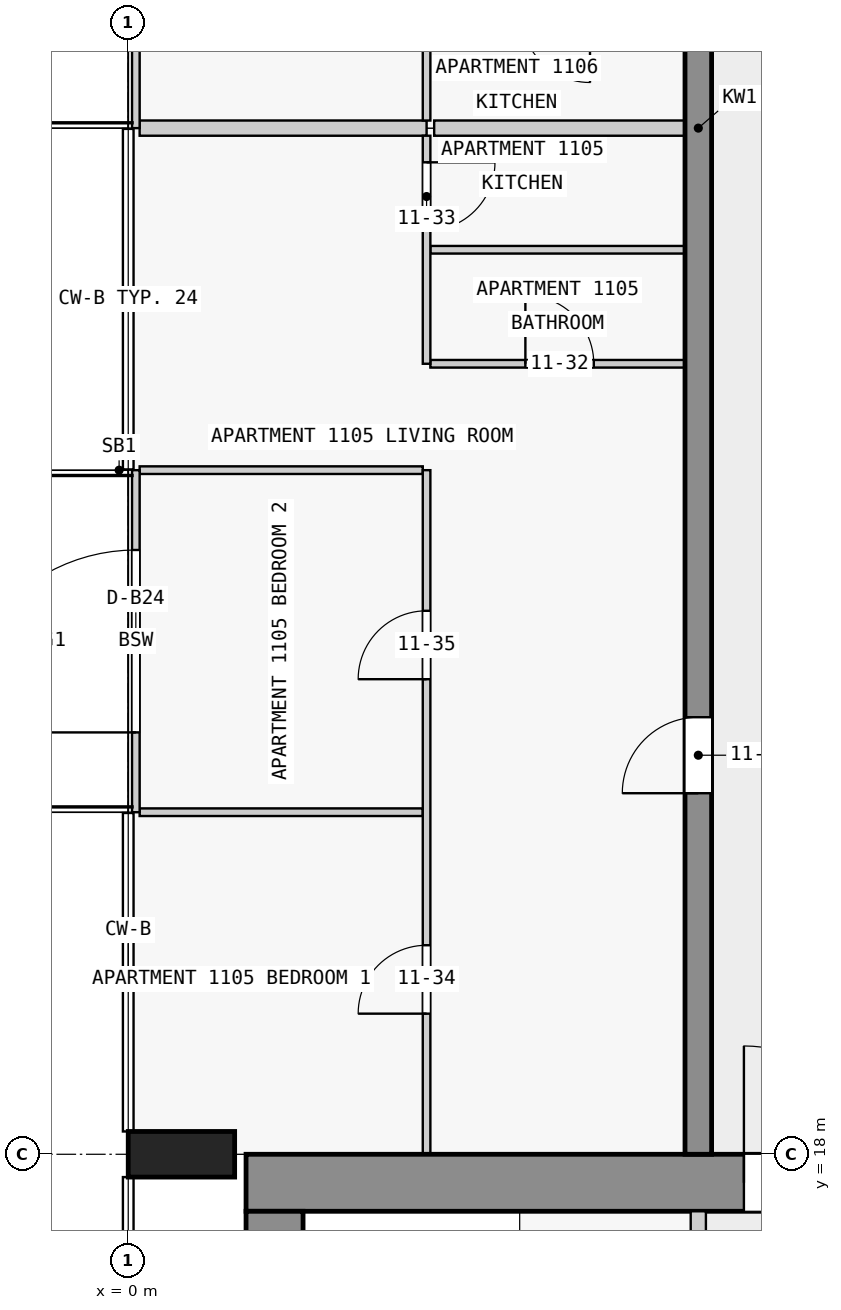
"""IFC4 building model, lengths in metres.
Left out: names, types, materials, properties, quantities, classifications, styles, units other than length and angle.
Written with IfcOpenShell. Run it as: python <this file> out.ifc"""

import sys

from ifc_helpers import new_model, si_unit, direction, frame, frame_2d, origin, origin_2d, place, context, subcontext, project, spatial, rectangle, extrude, element, fill, save


model = new_model("IFC4")
c1 = context("Model", 3, precision=1e-05, world=origin(), true_north=direction((0.0, 1.0)))
c2 = subcontext(c1, "Body", "Model", "MODEL_VIEW")
j1 = project(units=[si_unit("LENGTHUNIT", "METRE"), si_unit("PLANEANGLEUNIT", "RADIAN")], contexts=[c1])
p1 = place(None, origin())
s1 = spatial("IfcSite", under=j1, at=p1, CompositionType="ELEMENT")
p2 = place(p1, origin())
s2 = spatial("IfcBuilding", under=s1, at=p2, CompositionType="ELEMENT")
p3 = place(p2, frame((0.0, 0.0, 47.8)))
s3 = spatial("IfcBuildingStorey", under=s2, at=p3, CompositionType="ELEMENT", Elevation=47.8)
p4 = place(p3, frame((0.7, 18.0, 0.0), z_axis=(0.0, 0.0, 1.0), x_axis=(0.0, 1.0, 0.0)))
e1 = element("IfcColumn", 1, at=p4, inside=s3, PredefinedType="COLUMN", context=c2, shape_type="SweptSolid", body=[
    extrude(rectangle(XDim=0.6, YDim=1.4, at=origin_2d()), origin(), (0.0, 0.0, 1.0), 3.5),
])
p5 = place(p3, frame((1.55, 17.625, 0.0), z_axis=(0.0, 0.0, 1.0), x_axis=(1.0, 0.0, 0.0)))
e2 = element("IfcWall", 2, at=p5, inside=s3, PredefinedType="SHEAR", context=c2, shape_type="SweptSolid", body=[
    extrude(rectangle(XDim=20.95, YDim=0.75, at=frame_2d((10.475, 0.0))), origin(), (0.0, 0.0, 1.0), 3.25),
])
p6 = place(p5, frame((6.55, 0.0, 0.0)))
e3 = element("IfcOpeningElement", 3, at=p6, cuts=e2, PredefinedType="OPENING", context=c2, shape_type="SweptSolid", body=[
    extrude(rectangle(XDim=1.8, YDim=2.1, at=frame_2d((0.9, 1.05))), frame((0.0, 0.385, 0.0), z_axis=(0.0, -1.0, 0.0), x_axis=(1.0, 0.0, 0.0)), (0.0, 0.0, 1.0), 0.77),
])
p7 = place(p3, frame((1.925, 2.5, 0.0), z_axis=(0.0, 0.0, 1.0), x_axis=(0.0, 1.0, 0.0)))
e4 = element("IfcWall", 4, at=p7, inside=s3, PredefinedType="SHEAR", context=c2, shape_type="SweptSolid", body=[
    extrude(rectangle(XDim=14.75, YDim=0.75, at=frame_2d((7.375, 0.0))), origin(), (0.0, 0.0, 1.0), 3.25),
])
p8 = place(p3, frame((7.5, 18.0, 0.0), z_axis=(0.0, 0.0, 1.0), x_axis=(0.0, 1.0, 0.0)))
e5 = element("IfcWall", 5, at=p8, inside=s3, PredefinedType="SHEAR", context=c2, shape_type="SweptSolid", body=[
    extrude(rectangle(XDim=27.0, YDim=0.35, at=frame_2d((13.5, 0.0))), origin(), (0.0, 0.0, 1.0), 3.25),
])
p9 = place(p8, frame((4.75, 0.0, 0.0)))
e6 = element("IfcOpeningElement", 6, at=p9, cuts=e5, PredefinedType="OPENING", context=c2, shape_type="SweptSolid", body=[
    extrude(rectangle(XDim=1.0, YDim=2.1, at=frame_2d((0.5, 1.05))), frame((0.0, 0.185, 0.0), z_axis=(0.0, -1.0, 0.0), x_axis=(1.0, 0.0, 0.0)), (0.0, 0.0, 1.0), 0.37),
])
p10 = place(p8, frame((15.25, 0.0, 0.0)))
e7 = element("IfcOpeningElement", 7, at=p10, cuts=e5, PredefinedType="OPENING", context=c2, shape_type="SweptSolid", body=[
    extrude(rectangle(XDim=1.0, YDim=2.1, at=frame_2d((0.5, 1.05))), frame((0.0, 0.185, 0.0), z_axis=(0.0, -1.0, 0.0), x_axis=(1.0, 0.0, 0.0)), (0.0, 0.0, 1.0), 0.37),
])
p11 = place(p8, frame((19.75, 0.0, 0.0)))
e8 = element("IfcOpeningElement", 8, at=p11, cuts=e5, PredefinedType="OPENING", context=c2, shape_type="SweptSolid", body=[
    extrude(rectangle(XDim=1.0, YDim=2.1, at=frame_2d((0.5, 1.05))), frame((0.0, 0.185, 0.0), z_axis=(0.0, -1.0, 0.0), x_axis=(1.0, 0.0, 0.0)), (0.0, 0.0, 1.0), 0.37),
])
p12 = place(p8, frame((23.25, 0.0, 0.0)))
e9 = element("IfcOpeningElement", 9, at=p12, cuts=e5, PredefinedType="OPENING", context=c2, shape_type="SweptSolid", body=[
    extrude(rectangle(XDim=0.9, YDim=2.1, at=frame_2d((0.45, 1.05))), frame((0.0, 0.185, 0.0), z_axis=(0.0, -1.0, 0.0), x_axis=(1.0, 0.0, 0.0)), (0.0, 0.0, 1.0), 0.37),
])
p13 = place(p8, frame((25.45, 0.0, 0.0)))
e10 = element("IfcOpeningElement", 10, at=p13, cuts=e5, PredefinedType="OPENING", context=c2, shape_type="SweptSolid", body=[
    extrude(rectangle(XDim=1.0, YDim=2.1, at=frame_2d((0.5, 1.05))), frame((0.0, 0.185, 0.0), z_axis=(0.0, -1.0, 0.0), x_axis=(1.0, 0.0, 0.0)), (0.0, 0.0, 1.0), 0.37),
])
p14 = place(p3, frame((0.1, 22.5, 0.0), z_axis=(0.0, 0.0, 1.0), x_axis=(0.0, 1.0, 0.0)))
e11 = element("IfcWall", 11, at=p14, inside=s3, PredefinedType="STANDARD", context=c2, shape_type="SweptSolid", body=[
    extrude(rectangle(XDim=4.5, YDim=0.1, at=frame_2d((2.25, 0.0))), origin(), (0.0, 0.0, 1.0), 3.25),
])
p15 = place(p14, frame((1.05, 0.0, 0.0)))
e12 = element("IfcOpeningElement", 12, at=p15, cuts=e11, PredefinedType="OPENING", context=c2, shape_type="SweptSolid", body=[
    extrude(rectangle(XDim=2.4, YDim=2.4, at=frame_2d((1.2, 1.2))), frame((0.0, 0.06, 0.0), z_axis=(0.0, -1.0, 0.0), x_axis=(1.0, 0.0, 0.0)), (0.0, 0.0, 1.0), 0.12),
])
p16 = place(p3, frame((0.1, 31.5, 0.0), z_axis=(0.0, 0.0, 1.0), x_axis=(0.0, 1.0, 0.0)))
e13 = element("IfcWall", 13, at=p16, inside=s3, PredefinedType="STANDARD", context=c2, shape_type="SweptSolid", body=[
    extrude(rectangle(XDim=4.5, YDim=0.1, at=frame_2d((2.25, 0.0))), origin(), (0.0, 0.0, 1.0), 3.25),
])
p17 = place(p16, frame((1.05, 0.0, 0.0)))
e14 = element("IfcOpeningElement", 14, at=p17, cuts=e13, PredefinedType="OPENING", context=c2, shape_type="SweptSolid", body=[
    extrude(rectangle(XDim=2.4, YDim=2.4, at=frame_2d((1.2, 1.2))), frame((0.0, 0.06, 0.0), z_axis=(0.0, -1.0, 0.0), x_axis=(1.0, 0.0, 0.0)), (0.0, 0.0, 1.0), 0.12),
])
p18 = place(p3, frame((7.5, 10.1, 0.0), z_axis=(0.0, 0.0, 1.0), x_axis=(0.0, 1.0, 0.0)))
e15 = element("IfcWall", 15, at=p18, inside=s3, PredefinedType="PARTITIONING", context=c2, shape_type="SweptSolid", body=[
    extrude(rectangle(XDim=7.15, YDim=0.2, at=frame_2d((3.575, 0.0))), origin(), (0.0, 0.0, 1.0), 3.25),
])
p19 = place(p18, frame((1.5, 0.0, 0.0)))
e16 = element("IfcOpeningElement", 16, at=p19, cuts=e15, PredefinedType="OPENING", context=c2, shape_type="SweptSolid", body=[
    extrude(rectangle(XDim=0.9, YDim=2.1, at=frame_2d((0.45, 1.05))), frame((0.0, 0.11, 0.0), z_axis=(0.0, -1.0, 0.0), x_axis=(1.0, 0.0, 0.0)), (0.0, 0.0, 1.0), 0.22),
])
p20 = place(p18, frame((5.075, 0.0, 0.0)))
e17 = element("IfcOpeningElement", 17, at=p20, cuts=e15, PredefinedType="OPENING", context=c2, shape_type="SweptSolid", body=[
    extrude(rectangle(XDim=0.9, YDim=2.1, at=frame_2d((0.45, 1.05))), frame((0.0, 0.11, 0.0), z_axis=(0.0, -1.0, 0.0), x_axis=(1.0, 0.0, 0.0)), (0.0, 0.0, 1.0), 0.22),
])
for number, where, z_axis, x_axis in (
    (18, (3.875, 22.5, 0.0), (0.0, 0.0, 1.0), (-1.0, 0.0, 0.0)),
    (19, (3.875, 27.0, 0.0), (0.0, 0.0, 1.0), (-1.0, 0.0, 0.0)),
):
    element("IfcWall", number, at=place(p3, frame(where, z_axis=z_axis, x_axis=x_axis)), inside=s3, PredefinedType="PARTITIONING", context=c2, shape_type="SweptSolid", body=[
        extrude(rectangle(XDim=3.725, YDim=0.1, at=frame_2d((1.863, 0.0))), origin(), (0.0, 0.0, 1.0), 3.25),
    ])
p21 = place(p3, frame((3.975, 28.4, 0.0), z_axis=(0.0, 0.0, 1.0), x_axis=(1.0, 0.0, 0.0)))
e20 = element("IfcWall", 20, at=p21, inside=s3, PredefinedType="PARTITIONING", context=c2, shape_type="SweptSolid", body=[
    extrude(rectangle(XDim=3.35, YDim=0.1, at=frame_2d((1.675, 0.0))), origin(), (0.0, 0.0, 1.0), 3.25),
])
p22 = place(p21, frame((1.25, 0.0, 0.0)))
e21 = element("IfcOpeningElement", 21, at=p22, cuts=e20, PredefinedType="OPENING", context=c2, shape_type="SweptSolid", body=[
    extrude(rectangle(XDim=0.9, YDim=2.1, at=frame_2d((0.45, 1.05))), frame((0.0, 0.06, 0.0), z_axis=(0.0, -1.0, 0.0), x_axis=(1.0, 0.0, 0.0)), (0.0, 0.0, 1.0), 0.12),
])
p23 = place(p3, frame((7.325, 29.9, 0.0), z_axis=(0.0, 0.0, 1.0), x_axis=(-1.0, 0.0, 0.0)))
e22 = element("IfcWall", 22, at=p23, inside=s3, PredefinedType="PARTITIONING", context=c2, shape_type="SweptSolid", body=[
    extrude(rectangle(XDim=3.35, YDim=0.1, at=frame_2d((1.675, 0.0))), origin(), (0.0, 0.0, 1.0), 3.25),
])
p24 = place(p3, frame((7.325, 31.5, 0.0), z_axis=(0.0, 0.0, 1.0), x_axis=(-1.0, 0.0, 0.0)))
e23 = element("IfcWall", 23, at=p24, inside=s3, PredefinedType="PARTITIONING", context=c2, shape_type="SweptSolid", body=[
    extrude(rectangle(XDim=3.3, YDim=0.2, at=frame_2d((1.65, 0.0))), origin(), (0.0, 0.0, 1.0), 3.25),
])
p25 = place(p3, frame((0.15, 31.5, 0.0), z_axis=(0.0, 0.0, 1.0), x_axis=(1.0, 0.0, 0.0)))
e24 = element("IfcWall", 24, at=p25, inside=s3, PredefinedType="PARTITIONING", context=c2, shape_type="SweptSolid", body=[
    extrude(rectangle(XDim=3.775, YDim=0.2, at=frame_2d((1.888, 0.0))), origin(), (0.0, 0.0, 1.0), 3.25),
])
p26 = place(p3, frame((3.925, 31.4, 0.0), z_axis=(0.0, 0.0, 1.0), x_axis=(0.0, -1.0, 0.0)))
e25 = element("IfcWall", 25, at=p26, inside=s3, PredefinedType="PARTITIONING", context=c2, shape_type="SweptSolid", body=[
    extrude(rectangle(XDim=3.0, YDim=0.1, at=frame_2d((1.5, 0.0))), origin(), (0.0, 0.0, 1.0), 3.25),
])
p27 = place(p26, frame((0.35, 0.0, 0.0)))
e26 = element("IfcOpeningElement", 26, at=p27, cuts=e25, PredefinedType="OPENING", context=c2, shape_type="SweptSolid", body=[
    extrude(rectangle(XDim=0.9, YDim=2.1, at=frame_2d((0.45, 1.05))), frame((0.0, 0.06, 0.0), z_axis=(0.0, -1.0, 0.0), x_axis=(1.0, 0.0, 0.0)), (0.0, 0.0, 1.0), 0.12),
])
p28 = place(p3, frame((3.925, 33.0, 0.0), z_axis=(0.0, 0.0, 1.0), x_axis=(0.0, -1.0, 0.0)))
e27 = element("IfcWall", 27, at=p28, inside=s3, PredefinedType="PARTITIONING", context=c2, shape_type="SweptSolid", body=[
    extrude(rectangle(XDim=1.4, YDim=0.1, at=frame_2d((0.7, 0.0))), origin(), (0.0, 0.0, 1.0), 3.25),
])
p29 = place(p3, frame((3.925, 18.0, 0.0), z_axis=(0.0, 0.0, 1.0), x_axis=(0.0, 1.0, 0.0)))
e28 = element("IfcWall", 28, at=p29, inside=s3, PredefinedType="PARTITIONING", context=c2, shape_type="SweptSolid", body=[
    extrude(rectangle(XDim=9.0, YDim=0.1, at=frame_2d((4.5, 0.0))), origin(), (0.0, 0.0, 1.0), 3.25),
])
p30 = place(p29, frame((1.85, 0.0, 0.0)))
e29 = element("IfcOpeningElement", 29, at=p30, cuts=e28, PredefinedType="OPENING", context=c2, shape_type="SweptSolid", body=[
    extrude(rectangle(XDim=0.9, YDim=2.1, at=frame_2d((0.45, 1.05))), frame((0.0, 0.06, 0.0), z_axis=(0.0, -1.0, 0.0), x_axis=(1.0, 0.0, 0.0)), (0.0, 0.0, 1.0), 0.12),
])
p31 = place(p29, frame((6.25, 0.0, 0.0)))
e30 = element("IfcOpeningElement", 30, at=p31, cuts=e28, PredefinedType="OPENING", context=c2, shape_type="SweptSolid", body=[
    extrude(rectangle(XDim=0.9, YDim=2.1, at=frame_2d((0.45, 1.05))), frame((0.0, 0.06, 0.0), z_axis=(0.0, -1.0, 0.0), x_axis=(1.0, 0.0, 0.0)), (0.0, 0.0, 1.0), 0.12),
])
p32 = place(p15, origin())
e31 = element("IfcDoor", 31, at=p32, inside=s3, OperationType="SINGLE_SWING_LEFT", PredefinedType="DOOR", context=c2, shape_type="SweptSolid", body=[
    extrude(rectangle(XDim=2.4, YDim=2.4, at=frame_2d((1.2, 1.2))), frame((0.0, 0.025, 0.0), z_axis=(0.0, -1.0, 0.0), x_axis=(1.0, 0.0, 0.0)), (0.0, 0.0, 1.0), 0.05),
])
fill(e12, e31)
p33 = place(p6, origin())
e32 = element("IfcDoor", 32, at=p33, inside=s3, OperationType="DOUBLE_DOOR_SINGLE_SWING", PredefinedType="DOOR", context=c2, shape_type="SweptSolid", body=[
    extrude(rectangle(XDim=1.8, YDim=2.1, at=frame_2d((0.9, 1.05))), frame((0.0, 0.025, 0.0), z_axis=(0.0, -1.0, 0.0), x_axis=(1.0, 0.0, 0.0)), (0.0, 0.0, 1.0), 0.05),
])
fill(e3, e32)
p34 = place(p9, origin())
e33 = element("IfcDoor", 33, at=p34, inside=s3, OperationType="SINGLE_SWING_LEFT", PredefinedType="DOOR", context=c2, shape_type="SweptSolid", body=[
    extrude(rectangle(XDim=1.0, YDim=2.1, at=frame_2d((0.5, 1.05))), frame((0.0, 0.025, 0.0), z_axis=(0.0, -1.0, 0.0), x_axis=(1.0, 0.0, 0.0)), (0.0, 0.0, 1.0), 0.05),
])
fill(e6, e33)
p35 = place(p22, origin())
e34 = element("IfcDoor", 34, at=p35, inside=s3, OperationType="SINGLE_SWING_RIGHT", PredefinedType="DOOR", context=c2, shape_type="SweptSolid", body=[
    extrude(rectangle(XDim=0.9, YDim=2.1, at=frame_2d((0.45, 1.05))), frame((0.0, 0.025, 0.0), z_axis=(0.0, -1.0, 0.0), x_axis=(1.0, 0.0, 0.0)), (0.0, 0.0, 1.0), 0.05),
])
fill(e21, e34)
p36 = place(p27, origin())
e35 = element("IfcDoor", 35, at=p36, inside=s3, OperationType="SINGLE_SWING_LEFT", PredefinedType="DOOR", context=c2, shape_type="SweptSolid", body=[
    extrude(rectangle(XDim=0.9, YDim=2.1, at=frame_2d((0.45, 1.05))), frame((0.0, 0.025, 0.0), z_axis=(0.0, -1.0, 0.0), x_axis=(1.0, 0.0, 0.0)), (0.0, 0.0, 1.0), 0.05),
])
fill(e26, e35)
p37 = place(p30, origin())
e36 = element("IfcDoor", 36, at=p37, inside=s3, OperationType="SINGLE_SWING_LEFT", PredefinedType="DOOR", context=c2, shape_type="SweptSolid", body=[
    extrude(rectangle(XDim=0.9, YDim=2.1, at=frame_2d((0.45, 1.05))), frame((0.0, 0.025, 0.0), z_axis=(0.0, -1.0, 0.0), x_axis=(1.0, 0.0, 0.0)), (0.0, 0.0, 1.0), 0.05),
])
fill(e29, e36)
p38 = place(p31, origin())
e37 = element("IfcDoor", 37, at=p38, inside=s3, OperationType="SINGLE_SWING_RIGHT", PredefinedType="DOOR", context=c2, shape_type="SweptSolid", body=[
    extrude(rectangle(XDim=0.9, YDim=2.1, at=frame_2d((0.45, 1.05))), frame((0.0, 0.025, 0.0), z_axis=(0.0, -1.0, 0.0), x_axis=(1.0, 0.0, 0.0)), (0.0, 0.0, 1.0), 0.05),
])
fill(e30, e37)
save(model, sys.argv[1])
